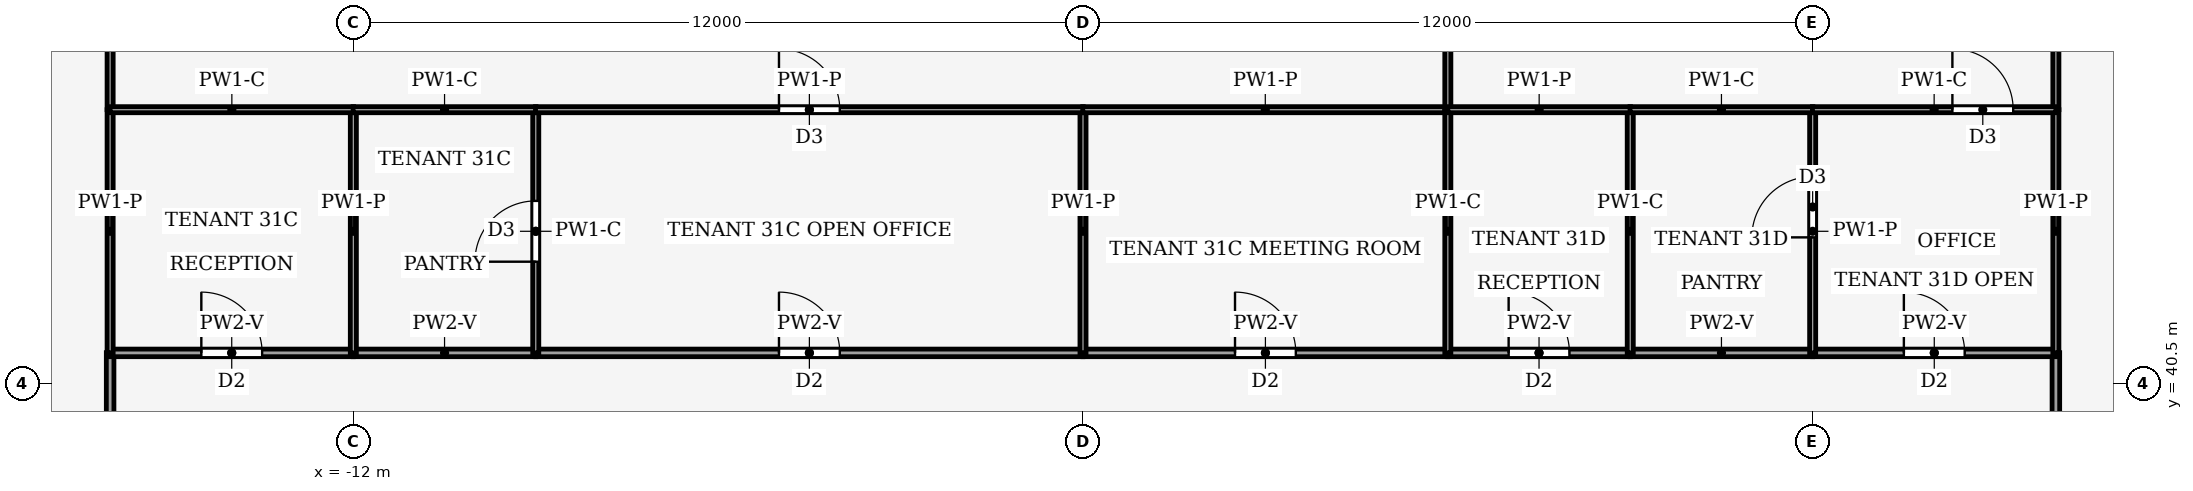
"""IFC4 building model, lengths in metres.
Left out: names, types, materials, properties, quantities, classifications, styles, units other than length and angle.
Written with IfcOpenShell. Run it as: python <this file> out.ifc"""

import sys

from ifc_helpers import new_model, si_unit, direction, frame, frame_2d, origin, place, context, subcontext, project, spatial, rectangle, extrude, element, fill, save


model = new_model("IFC4")
c1 = context("Model", 3, precision=1e-05, world=origin(), true_north=direction((0.0, 1.0)))
c2 = subcontext(c1, "Body", "Model", "MODEL_VIEW")
j1 = project(units=[si_unit("LENGTHUNIT", "METRE"), si_unit("PLANEANGLEUNIT", "RADIAN")], contexts=[c1])
p1 = place(None, origin())
s1 = spatial("IfcSite", under=j1, at=p1, CompositionType="ELEMENT")
p2 = place(p1, origin())
s2 = spatial("IfcBuilding", under=s1, at=p2, CompositionType="ELEMENT")
p3 = place(p2, frame((0.0, 0.0, 138.0)))
s3 = spatial("IfcBuildingStorey", under=s2, at=p3, CompositionType="ELEMENT", Elevation=138.0)
p4 = place(p3, frame((-16.0, 41.004, 0.0), z_axis=(0.0, 0.0, 1.0), x_axis=(0.0, -1.0, 0.0)))
e1 = element("IfcWall", 1, at=p4, inside=s3, PredefinedType="PARTITIONING", context=c2, shape_type="SweptSolid", body=[
    extrude(rectangle(XDim=8.004, YDim=0.125, at=frame_2d((4.002, 0.0))), origin(), (0.0, 0.0, 1.0), 3.14),
])
p5 = place(p4, frame((3.102, 0.0, 0.0)))
e2 = element("IfcOpeningElement", 2, at=p5, cuts=e1, PredefinedType="OPENING", context=c2, shape_type="SweptSolid", body=[
    extrude(rectangle(XDim=1.8, YDim=2.1, at=frame_2d((0.9, 1.05))), frame((0.0, 0.073, 0.0), z_axis=(0.0, -1.0, 0.0), x_axis=(1.0, 0.0, 0.0)), (0.0, 0.0, 1.0), 0.145),
])
p6 = place(p3, frame((16.0, 41.004, 0.0), z_axis=(0.0, 0.0, 1.0), x_axis=(0.0, -1.0, 0.0)))
e3 = element("IfcWall", 3, at=p6, inside=s3, PredefinedType="PARTITIONING", context=c2, shape_type="SweptSolid", body=[
    extrude(rectangle(XDim=11.004, YDim=0.125, at=frame_2d((5.502, 0.0))), origin(), (0.0, 0.0, 1.0), 3.14),
])
p7 = place(p6, frame((5.002, 0.0, 0.0)))
e4 = element("IfcOpeningElement", 4, at=p7, cuts=e3, PredefinedType="OPENING", context=c2, shape_type="SweptSolid", body=[
    extrude(rectangle(XDim=1.0, YDim=2.1, at=frame_2d((0.5, 1.05))), frame((0.0, 0.073, 0.0), z_axis=(0.0, -1.0, 0.0), x_axis=(1.0, 0.0, 0.0)), (0.0, 0.0, 1.0), 0.145),
])
p8 = place(p3, frame((-16.0, 41.0, 0.0), z_axis=(0.0, 0.0, 1.0), x_axis=(1.0, 0.0, 0.0)))
e5 = element("IfcWall", 5, at=p8, inside=s3, PredefinedType="PARTITIONING", context=c2, shape_type="SweptSolid", body=[
    extrude(rectangle(XDim=4.0, YDim=0.125, at=frame_2d((2.0, 0.0))), origin(), (0.0, 0.0, 1.0), 3.44),
])
p9 = place(p8, frame((1.5, 0.0, 0.0)))
e6 = element("IfcOpeningElement", 6, at=p9, cuts=e5, PredefinedType="OPENING", context=c2, shape_type="SweptSolid", body=[
    extrude(rectangle(XDim=1.0, YDim=2.1, at=frame_2d((0.5, 1.05))), frame((0.0, 0.073, 0.0), z_axis=(0.0, -1.0, 0.0), x_axis=(1.0, 0.0, 0.0)), (0.0, 0.0, 1.0), 0.145),
])
p10 = place(p3, frame((-9.0, 41.0, 0.0), z_axis=(0.0, 0.0, 1.0), x_axis=(-1.0, 0.0, 0.0)))
e7 = element("IfcWall", 7, at=p10, inside=s3, PredefinedType="PARTITIONING", context=c2, shape_type="SweptSolid", body=[
    extrude(rectangle(XDim=3.0, YDim=0.125, at=frame_2d((1.5, 0.0))), origin(), (0.0, 0.0, 1.0), 3.44),
])
p11 = place(p3, frame((-9.0, 41.0, 0.0), z_axis=(0.0, 0.0, 1.0), x_axis=(1.0, 0.0, 0.0)))
e8 = element("IfcWall", 8, at=p11, inside=s3, PredefinedType="PARTITIONING", context=c2, shape_type="SweptSolid", body=[
    extrude(rectangle(XDim=9.0, YDim=0.125, at=frame_2d((4.5, 0.0))), origin(), (0.0, 0.0, 1.0), 3.44),
])
p12 = place(p11, frame((4.0, 0.0, 0.0)))
e9 = element("IfcOpeningElement", 9, at=p12, cuts=e8, PredefinedType="OPENING", context=c2, shape_type="SweptSolid", body=[
    extrude(rectangle(XDim=1.0, YDim=2.1, at=frame_2d((0.5, 1.05))), frame((0.0, 0.073, 0.0), z_axis=(0.0, -1.0, 0.0), x_axis=(1.0, 0.0, 0.0)), (0.0, 0.0, 1.0), 0.145),
])
p13 = place(p3, frame((0.0, 41.0, 0.0), z_axis=(0.0, 0.0, 1.0), x_axis=(1.0, 0.0, 0.0)))
e10 = element("IfcWall", 10, at=p13, inside=s3, PredefinedType="PARTITIONING", context=c2, shape_type="SweptSolid", body=[
    extrude(rectangle(XDim=6.0, YDim=0.125, at=frame_2d((3.0, 0.0))), origin(), (0.0, 0.0, 1.0), 3.44),
])
p14 = place(p13, frame((2.5, 0.0, 0.0)))
e11 = element("IfcOpeningElement", 11, at=p14, cuts=e10, PredefinedType="OPENING", context=c2, shape_type="SweptSolid", body=[
    extrude(rectangle(XDim=1.0, YDim=2.1, at=frame_2d((0.5, 1.05))), frame((0.0, 0.073, 0.0), z_axis=(0.0, -1.0, 0.0), x_axis=(1.0, 0.0, 0.0)), (0.0, 0.0, 1.0), 0.145),
])
p15 = place(p3, frame((6.0, 41.0, 0.0), z_axis=(0.0, 0.0, 1.0), x_axis=(1.0, 0.0, 0.0)))
e12 = element("IfcWall", 12, at=p15, inside=s3, PredefinedType="PARTITIONING", context=c2, shape_type="SweptSolid", body=[
    extrude(rectangle(XDim=3.0, YDim=0.125, at=frame_2d((1.5, 0.0))), origin(), (0.0, 0.0, 1.0), 3.44),
])
p16 = place(p15, frame((1.0, 0.0, 0.0)))
e13 = element("IfcOpeningElement", 13, at=p16, cuts=e12, PredefinedType="OPENING", context=c2, shape_type="SweptSolid", body=[
    extrude(rectangle(XDim=1.0, YDim=2.1, at=frame_2d((0.5, 1.05))), frame((0.0, 0.073, 0.0), z_axis=(0.0, -1.0, 0.0), x_axis=(1.0, 0.0, 0.0)), (0.0, 0.0, 1.0), 0.145),
])
p17 = place(p3, frame((12.0, 41.0, 0.0), z_axis=(0.0, 0.0, 1.0), x_axis=(-1.0, 0.0, 0.0)))
e14 = element("IfcWall", 14, at=p17, inside=s3, PredefinedType="PARTITIONING", context=c2, shape_type="SweptSolid", body=[
    extrude(rectangle(XDim=3.0, YDim=0.125, at=frame_2d((1.5, 0.0))), origin(), (0.0, 0.0, 1.0), 3.44),
])
p18 = place(p3, frame((12.0, 41.0, 0.0), z_axis=(0.0, 0.0, 1.0), x_axis=(1.0, 0.0, 0.0)))
e15 = element("IfcWall", 15, at=p18, inside=s3, PredefinedType="PARTITIONING", context=c2, shape_type="SweptSolid", body=[
    extrude(rectangle(XDim=4.0, YDim=0.125, at=frame_2d((2.0, 0.0))), origin(), (0.0, 0.0, 1.0), 3.44),
])
p19 = place(p18, frame((1.5, 0.0, 0.0)))
e16 = element("IfcOpeningElement", 16, at=p19, cuts=e15, PredefinedType="OPENING", context=c2, shape_type="SweptSolid", body=[
    extrude(rectangle(XDim=1.0, YDim=2.1, at=frame_2d((0.5, 1.05))), frame((0.0, 0.073, 0.0), z_axis=(0.0, -1.0, 0.0), x_axis=(1.0, 0.0, 0.0)), (0.0, 0.0, 1.0), 0.145),
])
p20 = place(p3, frame((-16.0, 41.0, 0.0), z_axis=(0.0, 0.0, 1.0), x_axis=(0.0, 1.0, 0.0)))
e17 = element("IfcWall", 17, at=p20, inside=s3, PredefinedType="PARTITIONING", context=c2, shape_type="SweptSolid", body=[
    extrude(rectangle(XDim=4.0, YDim=0.1, at=frame_2d((2.0, 0.0))), origin(), (0.0, 0.0, 1.0), 3.44),
])
p21 = place(p3, frame((-16.0, 45.0, 0.0), z_axis=(0.0, 0.0, 1.0), x_axis=(0.0, 1.0, 0.0)))
e18 = element("IfcWall", 18, at=p21, inside=s3, PredefinedType="PARTITIONING", context=c2, shape_type="SweptSolid", body=[
    extrude(rectangle(XDim=9.0, YDim=0.1, at=frame_2d((4.5, 0.0))), origin(), (0.0, 0.0, 1.0), 3.24),
])
p22 = place(p3, frame((16.0, 45.0, 0.0), z_axis=(0.0, 0.0, 1.0), x_axis=(0.0, -1.0, 0.0)))
e19 = element("IfcWall", 19, at=p22, inside=s3, PredefinedType="PARTITIONING", context=c2, shape_type="SweptSolid", body=[
    extrude(rectangle(XDim=4.0, YDim=0.1, at=frame_2d((2.0, 0.0))), origin(), (0.0, 0.0, 1.0), 3.44),
])
p23 = place(p3, frame((16.0, 57.0, 0.0), z_axis=(0.0, 0.0, 1.0), x_axis=(0.0, -1.0, 0.0)))
e20 = element("IfcWall", 20, at=p23, inside=s3, PredefinedType="PARTITIONING", context=c2, shape_type="SweptSolid", body=[
    extrude(rectangle(XDim=12.0, YDim=0.1, at=frame_2d((6.0, 0.0))), origin(), (0.0, 0.0, 1.0), 3.24),
])
p24 = place(p3, frame((-12.0, 41.0, 0.0), z_axis=(0.0, 0.0, 1.0), x_axis=(0.0, 1.0, 0.0)))
e21 = element("IfcWall", 21, at=p24, inside=s3, PredefinedType="PARTITIONING", context=c2, shape_type="SweptSolid", body=[
    extrude(rectangle(XDim=4.0, YDim=0.1, at=frame_2d((2.0, 0.0))), origin(), (0.0, 0.0, 1.0), 3.44),
])
p25 = place(p3, frame((-11.996, 45.0, 0.0), z_axis=(0.0, 0.0, 1.0), x_axis=(-1.0, 0.0, 0.0)))
e22 = element("IfcWall", 22, at=p25, inside=s3, PredefinedType="PARTITIONING", context=c2, shape_type="SweptSolid", body=[
    extrude(rectangle(XDim=4.004, YDim=0.1, at=frame_2d((2.002, 0.0))), origin(), (0.0, 0.0, 1.0), 3.87),
])
p26 = place(p3, frame((-9.0, 41.0, 0.0), z_axis=(0.0, 0.0, 1.0), x_axis=(0.0, 1.0, 0.0)))
e23 = element("IfcWall", 23, at=p26, inside=s3, PredefinedType="PARTITIONING", context=c2, shape_type="SweptSolid", body=[
    extrude(rectangle(XDim=4.0, YDim=0.1, at=frame_2d((2.0, 0.0))), origin(), (0.0, 0.0, 1.0), 3.87),
])
p27 = place(p26, frame((1.5, 0.0, 0.0)))
e24 = element("IfcOpeningElement", 24, at=p27, cuts=e23, PredefinedType="OPENING", context=c2, shape_type="SweptSolid", body=[
    extrude(rectangle(XDim=1.0, YDim=2.1, at=frame_2d((0.5, 1.05))), frame((0.0, 0.06, 0.0), z_axis=(0.0, -1.0, 0.0), x_axis=(1.0, 0.0, 0.0)), (0.0, 0.0, 1.0), 0.12),
])
p28 = place(p3, frame((-8.996, 45.0, 0.0), z_axis=(0.0, 0.0, 1.0), x_axis=(-1.0, 0.0, 0.0)))
e25 = element("IfcWall", 25, at=p28, inside=s3, PredefinedType="PARTITIONING", context=c2, shape_type="SweptSolid", body=[
    extrude(rectangle(XDim=3.008, YDim=0.1, at=frame_2d((1.504, 0.0))), origin(), (0.0, 0.0, 1.0), 3.87),
])
p29 = place(p3, frame((0.0, 41.0, 0.0), z_axis=(0.0, 0.0, 1.0), x_axis=(0.0, 1.0, 0.0)))
e26 = element("IfcWall", 26, at=p29, inside=s3, PredefinedType="PARTITIONING", context=c2, shape_type="SweptSolid", body=[
    extrude(rectangle(XDim=4.0, YDim=0.1, at=frame_2d((2.0, 0.0))), origin(), (0.0, 0.0, 1.0), 3.44),
])
p30 = place(p3, frame((-9.004, 45.0, 0.0), z_axis=(0.0, 0.0, 1.0), x_axis=(1.0, 0.0, 0.0)))
e27 = element("IfcWall", 27, at=p30, inside=s3, PredefinedType="PARTITIONING", context=c2, shape_type="SweptSolid", body=[
    extrude(rectangle(XDim=9.008, YDim=0.1, at=frame_2d((4.504, 0.0))), origin(), (0.0, 0.0, 1.0), 3.44),
])
p31 = place(p30, frame((4.004, 0.0, 0.0)))
e28 = element("IfcOpeningElement", 28, at=p31, cuts=e27, PredefinedType="OPENING", context=c2, shape_type="SweptSolid", body=[
    extrude(rectangle(XDim=1.0, YDim=2.1, at=frame_2d((0.5, 1.05))), frame((0.0, 0.06, 0.0), z_axis=(0.0, -1.0, 0.0), x_axis=(1.0, 0.0, 0.0)), (0.0, 0.0, 1.0), 0.12),
])
p32 = place(p3, frame((6.0, 45.0, 0.0), z_axis=(0.0, 0.0, 1.0), x_axis=(-1.0, 0.0, 0.0)))
e29 = element("IfcWall", 29, at=p32, inside=s3, PredefinedType="PARTITIONING", context=c2, shape_type="SweptSolid", body=[
    extrude(rectangle(XDim=6.004, YDim=0.1, at=frame_2d((3.002, 0.0))), origin(), (0.0, 0.0, 1.0), 3.44),
])
p33 = place(p3, frame((6.0, 41.0, 0.0), z_axis=(0.0, 0.0, 1.0), x_axis=(0.0, 1.0, 0.0)))
e30 = element("IfcWall", 30, at=p33, inside=s3, PredefinedType="PARTITIONING", context=c2, shape_type="SweptSolid", body=[
    extrude(rectangle(XDim=4.0, YDim=0.1, at=frame_2d((2.0, 0.0))), origin(), (0.0, 0.0, 1.0), 3.87),
])
p34 = place(p3, frame((6.0, 45.0, 0.0), z_axis=(0.0, 0.0, 1.0), x_axis=(0.0, 1.0, 0.0)))
e31 = element("IfcWall", 31, at=p34, inside=s3, PredefinedType="PARTITIONING", context=c2, shape_type="SweptSolid", body=[
    extrude(rectangle(XDim=9.004, YDim=0.1, at=frame_2d((4.502, 0.0))), origin(), (0.0, 0.0, 1.0), 3.24),
])
p35 = place(p3, frame((9.0, 41.0, 0.0), z_axis=(0.0, 0.0, 1.0), x_axis=(0.0, 1.0, 0.0)))
e32 = element("IfcWall", 32, at=p35, inside=s3, PredefinedType="PARTITIONING", context=c2, shape_type="SweptSolid", body=[
    extrude(rectangle(XDim=4.0, YDim=0.1, at=frame_2d((2.0, 0.0))), origin(), (0.0, 0.0, 1.0), 3.87),
])
p36 = place(p3, frame((9.004, 45.0, 0.0), z_axis=(0.0, 0.0, 1.0), x_axis=(-1.0, 0.0, 0.0)))
e33 = element("IfcWall", 33, at=p36, inside=s3, PredefinedType="PARTITIONING", context=c2, shape_type="SweptSolid", body=[
    extrude(rectangle(XDim=3.004, YDim=0.1, at=frame_2d((1.502, 0.0))), origin(), (0.0, 0.0, 1.0), 3.44),
])
p37 = place(p3, frame((12.0, 41.0, 0.0), z_axis=(0.0, 0.0, 1.0), x_axis=(0.0, 1.0, 0.0)))
e34 = element("IfcWall", 34, at=p37, inside=s3, PredefinedType="PARTITIONING", context=c2, shape_type="SweptSolid", body=[
    extrude(rectangle(XDim=4.0, YDim=0.1, at=frame_2d((2.0, 0.0))), origin(), (0.0, 0.0, 1.0), 3.44),
])
p38 = place(p37, frame((1.9, 0.0, 0.0)))
e35 = element("IfcOpeningElement", 35, at=p38, cuts=e34, PredefinedType="OPENING", context=c2, shape_type="SweptSolid", body=[
    extrude(rectangle(XDim=1.0, YDim=2.1, at=frame_2d((0.5, 1.05))), frame((0.0, 0.06, 0.0), z_axis=(0.0, -1.0, 0.0), x_axis=(1.0, 0.0, 0.0)), (0.0, 0.0, 1.0), 0.12),
])
p39 = place(p3, frame((12.004, 45.0, 0.0), z_axis=(0.0, 0.0, 1.0), x_axis=(-1.0, 0.0, 0.0)))
e36 = element("IfcWall", 36, at=p39, inside=s3, PredefinedType="PARTITIONING", context=c2, shape_type="SweptSolid", body=[
    extrude(rectangle(XDim=3.008, YDim=0.1, at=frame_2d((1.504, 0.0))), origin(), (0.0, 0.0, 1.0), 3.87),
])
p40 = place(p3, frame((11.996, 45.0, 0.0), z_axis=(0.0, 0.0, 1.0), x_axis=(1.0, 0.0, 0.0)))
e37 = element("IfcWall", 37, at=p40, inside=s3, PredefinedType="PARTITIONING", context=c2, shape_type="SweptSolid", body=[
    extrude(rectangle(XDim=4.004, YDim=0.1, at=frame_2d((2.002, 0.0))), origin(), (0.0, 0.0, 1.0), 3.87),
])
p41 = place(p40, frame((2.302, 0.0, 0.0)))
e38 = element("IfcOpeningElement", 38, at=p41, cuts=e37, PredefinedType="OPENING", context=c2, shape_type="SweptSolid", body=[
    extrude(rectangle(XDim=1.0, YDim=2.1, at=frame_2d((0.5, 1.05))), frame((0.0, 0.06, 0.0), z_axis=(0.0, -1.0, 0.0), x_axis=(1.0, 0.0, 0.0)), (0.0, 0.0, 1.0), 0.12),
])
p42 = place(p9, origin())
e39 = element("IfcDoor", 39, at=p42, inside=s3, OperationType="SINGLE_SWING_LEFT", PredefinedType="DOOR", context=c2, shape_type="SweptSolid", body=[
    extrude(rectangle(XDim=1.0, YDim=2.1, at=frame_2d((0.5, 1.05))), frame((0.0, 0.025, 0.0), z_axis=(0.0, -1.0, 0.0), x_axis=(1.0, 0.0, 0.0)), (0.0, 0.0, 1.0), 0.05),
])
fill(e6, e39)
p43 = place(p12, origin())
e40 = element("IfcDoor", 40, at=p43, inside=s3, OperationType="SINGLE_SWING_RIGHT", PredefinedType="DOOR", context=c2, shape_type="SweptSolid", body=[
    extrude(rectangle(XDim=1.0, YDim=2.1, at=frame_2d((0.5, 1.05))), frame((0.0, 0.025, 0.0), z_axis=(0.0, -1.0, 0.0), x_axis=(1.0, 0.0, 0.0)), (0.0, 0.0, 1.0), 0.05),
])
fill(e9, e40)
p44 = place(p14, origin())
e41 = element("IfcDoor", 41, at=p44, inside=s3, OperationType="SINGLE_SWING_LEFT", PredefinedType="DOOR", context=c2, shape_type="SweptSolid", body=[
    extrude(rectangle(XDim=1.0, YDim=2.1, at=frame_2d((0.5, 1.05))), frame((0.0, 0.025, 0.0), z_axis=(0.0, -1.0, 0.0), x_axis=(1.0, 0.0, 0.0)), (0.0, 0.0, 1.0), 0.05),
])
fill(e11, e41)
p45 = place(p16, origin())
e42 = element("IfcDoor", 42, at=p45, inside=s3, OperationType="SINGLE_SWING_RIGHT", PredefinedType="DOOR", context=c2, shape_type="SweptSolid", body=[
    extrude(rectangle(XDim=1.0, YDim=2.1, at=frame_2d((0.5, 1.05))), frame((0.0, 0.025, 0.0), z_axis=(0.0, -1.0, 0.0), x_axis=(1.0, 0.0, 0.0)), (0.0, 0.0, 1.0), 0.05),
])
fill(e13, e42)
p46 = place(p19, origin())
e43 = element("IfcDoor", 43, at=p46, inside=s3, OperationType="SINGLE_SWING_LEFT", PredefinedType="DOOR", context=c2, shape_type="SweptSolid", body=[
    extrude(rectangle(XDim=1.0, YDim=2.1, at=frame_2d((0.5, 1.05))), frame((0.0, 0.025, 0.0), z_axis=(0.0, -1.0, 0.0), x_axis=(1.0, 0.0, 0.0)), (0.0, 0.0, 1.0), 0.05),
])
fill(e16, e43)
p47 = place(p27, origin())
e44 = element("IfcDoor", 44, at=p47, inside=s3, OperationType="SINGLE_SWING_RIGHT", PredefinedType="DOOR", context=c2, shape_type="SweptSolid", body=[
    extrude(rectangle(XDim=1.0, YDim=2.1, at=frame_2d((0.5, 1.05))), frame((0.0, 0.025, 0.0), z_axis=(0.0, -1.0, 0.0), x_axis=(1.0, 0.0, 0.0)), (0.0, 0.0, 1.0), 0.05),
])
fill(e24, e44)
p48 = place(p31, origin())
e45 = element("IfcDoor", 45, at=p48, inside=s3, OperationType="SINGLE_SWING_LEFT", PredefinedType="DOOR", context=c2, shape_type="SweptSolid", body=[
    extrude(rectangle(XDim=1.0, YDim=2.1, at=frame_2d((0.5, 1.05))), frame((0.0, 0.025, 0.0), z_axis=(0.0, -1.0, 0.0), x_axis=(1.0, 0.0, 0.0)), (0.0, 0.0, 1.0), 0.05),
])
fill(e28, e45)
p49 = place(p38, origin())
e46 = element("IfcDoor", 46, at=p49, inside=s3, OperationType="SINGLE_SWING_RIGHT", PredefinedType="DOOR", context=c2, shape_type="SweptSolid", body=[
    extrude(rectangle(XDim=1.0, YDim=2.1, at=frame_2d((0.5, 1.05))), frame((0.0, 0.025, 0.0), z_axis=(0.0, -1.0, 0.0), x_axis=(1.0, 0.0, 0.0)), (0.0, 0.0, 1.0), 0.05),
])
fill(e35, e46)
p50 = place(p41, origin())
e47 = element("IfcDoor", 47, at=p50, inside=s3, OperationType="SINGLE_SWING_RIGHT", PredefinedType="DOOR", context=c2, shape_type="SweptSolid", body=[
    extrude(rectangle(XDim=1.0, YDim=2.1, at=frame_2d((0.5, 1.05))), frame((0.0, 0.025, 0.0), z_axis=(0.0, -1.0, 0.0), x_axis=(1.0, 0.0, 0.0)), (0.0, 0.0, 1.0), 0.05),
])
fill(e38, e47)
save(model, sys.argv[1])
